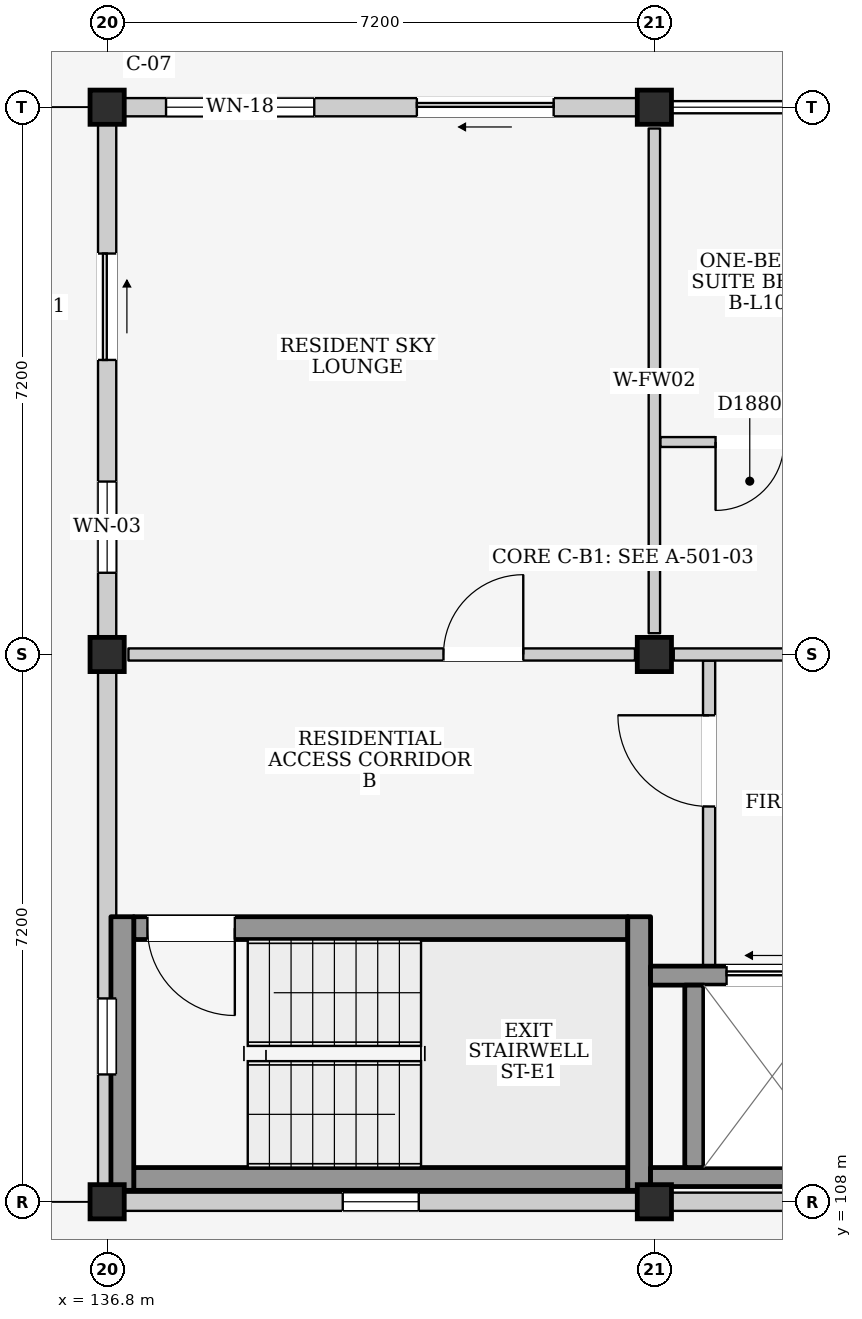
"""IFC4 building model, lengths in metres.
Left out: names, types, materials, properties, quantities, classifications, styles, units other than length and angle.
Written with IfcOpenShell. Run it as: python <this file> out.ifc"""

import sys

from ifc_helpers import new_model, si_unit, direction, frame, frame_2d, origin, origin_2d, place, context, subcontext, project, spatial, rectangle, extrude, element, fill, save


model = new_model("IFC4")
c1 = context("Model", 3, precision=1e-05, world=origin(), true_north=direction((0.0, 1.0)))
c2 = subcontext(c1, "Body", "Model", "MODEL_VIEW")
j1 = project(units=[si_unit("LENGTHUNIT", "METRE"), si_unit("PLANEANGLEUNIT", "RADIAN")], contexts=[c1])
p1 = place(None, origin())
s1 = spatial("IfcSite", under=j1, at=p1, CompositionType="ELEMENT")
p2 = place(p1, origin())
s2 = spatial("IfcBuilding", under=s1, at=p2, CompositionType="ELEMENT")
p3 = place(p2, frame((0.0, 0.0, 34.8)))
s3 = spatial("IfcBuildingStorey", under=s2, at=p3, CompositionType="ELEMENT", Elevation=34.8)
for number, where, z_axis, x_axis in (
    (1, (136.8, 108.0, 0.0), (0.0, 0.0, 1.0), (1.0, 0.0, 0.0)),
    (2, (136.8, 115.2, 0.0), (0.0, 0.0, 1.0), (1.0, 0.0, 0.0)),
    (3, (136.8, 122.4, 0.0), (0.0, 0.0, 1.0), (1.0, 0.0, 0.0)),
    (4, (144.0, 108.0, 0.0), (0.0, 0.0, 1.0), (1.0, 0.0, 0.0)),
    (5, (144.0, 115.2, 0.0), (0.0, 0.0, 1.0), (1.0, 0.0, 0.0)),
    (6, (144.0, 122.4, 0.0), (0.0, 0.0, 1.0), (1.0, 0.0, 0.0)),
):
    element("IfcColumn", number, at=place(p3, frame(where, z_axis=z_axis, x_axis=x_axis)), inside=s3, PredefinedType="COLUMN", context=c2, shape_type="SweptSolid", body=[
        extrude(rectangle(XDim=0.45, YDim=0.45, at=origin_2d()), origin(), (0.0, 0.0, 1.0), 3.2),
    ])
p4 = place(p3, frame((137.025, 108.0, 0.0), z_axis=(0.0, 0.0, 1.0), x_axis=(1.0, 0.0, 0.0)))
e7 = element("IfcWall", 7, at=p4, inside=s3, PredefinedType="ELEMENTEDWALL", context=c2, shape_type="SweptSolid", body=[
    extrude(rectangle(XDim=6.75, YDim=0.24, at=frame_2d((3.375, 0.0))), origin(), (0.0, 0.0, 1.0), 2.345),
])
p5 = place(p4, frame((2.875, 0.0, 1.2)))
e8 = element("IfcOpeningElement", 8, at=p5, cuts=e7, PredefinedType="OPENING", context=c2, shape_type="SweptSolid", body=[
    extrude(rectangle(XDim=1.0, YDim=0.9, at=frame_2d((0.5, 0.45))), frame((0.0, 0.135, 0.0), z_axis=(0.0, -1.0, 0.0), x_axis=(1.0, 0.0, 0.0)), (0.0, 0.0, 1.0), 0.27),
])
p6 = place(p3, frame((136.8, 108.225, 0.0), z_axis=(0.0, 0.0, 1.0), x_axis=(0.0, 1.0, 0.0)))
e9 = element("IfcWall", 9, at=p6, inside=s3, PredefinedType="ELEMENTEDWALL", context=c2, shape_type="SweptSolid", body=[
    extrude(rectangle(XDim=6.75, YDim=0.24, at=frame_2d((3.375, 0.0))), origin(), (0.0, 0.0, 1.0), 2.445),
])
p7 = place(p6, frame((1.45, 0.0, 1.2)))
e10 = element("IfcOpeningElement", 10, at=p7, cuts=e9, PredefinedType="OPENING", context=c2, shape_type="SweptSolid", body=[
    extrude(rectangle(XDim=1.0, YDim=0.9, at=frame_2d((0.5, 0.45))), frame((0.0, 0.135, 0.0), z_axis=(0.0, -1.0, 0.0), x_axis=(1.0, 0.0, 0.0)), (0.0, 0.0, 1.0), 0.27),
])
p8 = place(p3, frame((137.025, 122.4, 0.0), z_axis=(0.0, 0.0, 1.0), x_axis=(1.0, 0.0, 0.0)))
e11 = element("IfcWall", 11, at=p8, inside=s3, PredefinedType="ELEMENTEDWALL", context=c2, shape_type="SweptSolid", body=[
    extrude(rectangle(XDim=6.75, YDim=0.24, at=frame_2d((3.375, 0.0))), origin(), (0.0, 0.0, 1.0), 2.495),
])
p9 = place(p8, frame((3.85, 0.0, 0.0)))
e12 = element("IfcOpeningElement", 12, at=p9, cuts=e11, PredefinedType="OPENING", context=c2, shape_type="SweptSolid", body=[
    extrude(rectangle(XDim=1.8, YDim=2.12, at=frame_2d((0.9, 1.06))), frame((0.0, 0.135, 0.0), z_axis=(0.0, -1.0, 0.0), x_axis=(1.0, 0.0, 0.0)), (0.0, 0.0, 1.0), 0.27),
])
p10 = place(p8, frame((0.55, 0.0, 0.835)))
e13 = element("IfcOpeningElement", 13, at=p10, cuts=e11, PredefinedType="OPENING", context=c2, shape_type="SweptSolid", body=[
    extrude(rectangle(XDim=1.95, YDim=1.55, at=frame_2d((0.975, 0.775))), frame((0.0, 0.135, 0.0), z_axis=(0.0, -1.0, 0.0), x_axis=(1.0, 0.0, 0.0)), (0.0, 0.0, 1.0), 0.27),
])
p11 = place(p3, frame((136.8, 115.425, 0.0), z_axis=(0.0, 0.0, 1.0), x_axis=(0.0, 1.0, 0.0)))
e14 = element("IfcWall", 14, at=p11, inside=s3, PredefinedType="ELEMENTEDWALL", context=c2, shape_type="SweptSolid", body=[
    extrude(rectangle(XDim=6.75, YDim=0.24, at=frame_2d((3.375, 0.0))), origin(), (0.0, 0.0, 1.0), 2.445),
])
p12 = place(p11, frame((3.65, 0.0, 0.0)))
e15 = element("IfcOpeningElement", 15, at=p12, cuts=e14, PredefinedType="OPENING", context=c2, shape_type="SweptSolid", body=[
    extrude(rectangle(XDim=1.4, YDim=2.1, at=frame_2d((0.7, 1.05))), frame((0.0, 0.135, 0.0), z_axis=(0.0, -1.0, 0.0), x_axis=(1.0, 0.0, 0.0)), (0.0, 0.0, 1.0), 0.27),
])
p13 = place(p11, frame((0.85, 0.0, 0.95)))
e16 = element("IfcOpeningElement", 16, at=p13, cuts=e14, PredefinedType="OPENING", context=c2, shape_type="SweptSolid", body=[
    extrude(rectangle(XDim=1.2, YDim=1.35, at=frame_2d((0.6, 0.675))), frame((0.0, 0.135, 0.0), z_axis=(0.0, -1.0, 0.0), x_axis=(1.0, 0.0, 0.0)), (0.0, 0.0, 1.0), 0.27),
])
p14 = place(p3, frame((144.225, 108.0, 0.0), z_axis=(0.0, 0.0, 1.0), x_axis=(1.0, 0.0, 0.0)))
e17 = element("IfcWall", 17, at=p14, inside=s3, PredefinedType="ELEMENTEDWALL", context=c2, shape_type="SweptSolid", body=[
    extrude(rectangle(XDim=6.75, YDim=0.24, at=frame_2d((3.375, 0.0))), origin(), (0.0, 0.0, 1.0), 2.345),
])
p15 = place(p14, frame((2.875, 0.0, 1.2)))
e18 = element("IfcOpeningElement", 18, at=p15, cuts=e17, PredefinedType="OPENING", context=c2, shape_type="SweptSolid", body=[
    extrude(rectangle(XDim=1.0, YDim=0.9, at=frame_2d((0.5, 0.45))), frame((0.0, 0.135, 0.0), z_axis=(0.0, -1.0, 0.0), x_axis=(1.0, 0.0, 0.0)), (0.0, 0.0, 1.0), 0.27),
])
p16 = place(p3, frame((137.15, 108.3, 0.0), z_axis=(0.0, 0.0, 1.0), x_axis=(1.0, 0.0, 0.0)))
e19 = element("IfcWall", 19, at=p16, inside=s3, PredefinedType="SHEAR", context=c2, shape_type="SweptSolid", body=[
    extrude(rectangle(XDim=6.5, YDim=0.3, at=frame_2d((3.25, 0.0))), origin(), (0.0, 0.0, 1.0), 2.96),
])
p17 = place(p3, frame((137.15, 111.6, 0.0), z_axis=(0.0, 0.0, 1.0), x_axis=(1.0, 0.0, 0.0)))
e20 = element("IfcWall", 20, at=p17, inside=s3, PredefinedType="SHEAR", context=c2, shape_type="SweptSolid", body=[
    extrude(rectangle(XDim=6.5, YDim=0.3, at=frame_2d((3.25, 0.0))), origin(), (0.0, 0.0, 1.0), 2.96),
])
p18 = place(p17, frame((0.18, 0.0, 0.0)))
e21 = element("IfcOpeningElement", 21, at=p18, cuts=e20, PredefinedType="OPENING", context=c2, shape_type="SweptSolid", body=[
    extrude(rectangle(XDim=1.15, YDim=2.2, at=frame_2d((0.575, 1.1))), frame((0.0, 0.165, 0.0), z_axis=(0.0, -1.0, 0.0), x_axis=(1.0, 0.0, 0.0)), (0.0, 0.0, 1.0), 0.33),
])
for number, where, z_axis, x_axis in (
    (22, (137.0, 108.15, 0.0), (0.0, 0.0, 1.0), (0.0, 1.0, 0.0)),
    (23, (143.8, 108.15, 0.0), (0.0, 0.0, 1.0), (0.0, 1.0, 0.0)),
):
    element("IfcWall", number, at=place(p3, frame(where, z_axis=z_axis, x_axis=x_axis)), inside=s3, PredefinedType="SHEAR", context=c2, shape_type="SweptSolid", body=[
        extrude(rectangle(XDim=3.6, YDim=0.3, at=frame_2d((1.8, 0.0))), origin(), (0.0, 0.0, 1.0), 2.96),
    ])
p19 = place(p3, frame((144.72, 111.1, 0.0), z_axis=(0.0, 0.0, 1.0), x_axis=(0.0, 1.0, 0.0)))
e24 = element("IfcWall", 24, at=p19, inside=s3, PredefinedType="PARTITIONING", context=c2, shape_type="SweptSolid", body=[
    extrude(rectangle(XDim=4.02, YDim=0.16, at=frame_2d((2.01, 0.0))), origin(), (0.0, 0.0, 1.0), 2.96),
])
p20 = place(p19, frame((2.1, 0.0, 0.0)))
e25 = element("IfcOpeningElement", 25, at=p20, cuts=e24, PredefinedType="OPENING", context=c2, shape_type="SweptSolid", body=[
    extrude(rectangle(XDim=1.2, YDim=2.2, at=frame_2d((0.6, 1.1))), frame((0.0, 0.095, 0.0), z_axis=(0.0, -1.0, 0.0), x_axis=(1.0, 0.0, 0.0)), (0.0, 0.0, 1.0), 0.19),
])
p21 = place(p3, frame((143.95, 108.325, 0.0), z_axis=(0.0, 0.0, 1.0), x_axis=(1.0, 0.0, 0.0)))
e26 = element("IfcWall", 26, at=p21, inside=s3, PredefinedType="SHEAR", context=c2, shape_type="SweptSolid", body=[
    extrude(rectangle(XDim=2.675, YDim=0.25, at=frame_2d((1.337, 0.0))), origin(), (0.0, 0.0, 1.0), 2.96),
])
p22 = place(p3, frame((143.95, 110.975, 0.0), z_axis=(0.0, 0.0, 1.0), x_axis=(1.0, 0.0, 0.0)))
e27 = element("IfcWall", 27, at=p22, inside=s3, PredefinedType="SHEAR", context=c2, shape_type="SweptSolid", body=[
    extrude(rectangle(XDim=2.675, YDim=0.25, at=frame_2d((1.337, 0.0))), origin(), (0.0, 0.0, 1.0), 2.96),
])
p23 = place(p22, frame((1.0, 0.0, 0.0)))
e28 = element("IfcOpeningElement", 28, at=p23, cuts=e27, PredefinedType="OPENING", context=c2, shape_type="SweptSolid", body=[
    extrude(rectangle(XDim=1.2, YDim=2.25, at=frame_2d((0.6, 1.125))), frame((0.0, 0.14, 0.0), z_axis=(0.0, -1.0, 0.0), x_axis=(1.0, 0.0, 0.0)), (0.0, 0.0, 1.0), 0.28),
])
p24 = place(p3, frame((144.525, 108.45, 0.0), z_axis=(0.0, 0.0, 1.0), x_axis=(0.0, 1.0, 0.0)))
e29 = element("IfcWall", 29, at=p24, inside=s3, PredefinedType="SHEAR", context=c2, shape_type="SweptSolid", body=[
    extrude(rectangle(XDim=2.4, YDim=0.25, at=frame_2d((1.2, 0.0))), origin(), (0.0, 0.0, 1.0), 2.96),
])
p25 = place(p3, frame((137.08, 115.2, 0.0), z_axis=(0.0, 0.0, 1.0), x_axis=(1.0, 0.0, 0.0)))
e30 = element("IfcWall", 30, at=p25, inside=s3, PredefinedType="PARTITIONING", context=c2, shape_type="SweptSolid", body=[
    extrude(rectangle(XDim=6.665, YDim=0.16, at=frame_2d((3.333, 0.0))), origin(), (0.0, 0.0, 1.0), 2.345),
])
p26 = place(p25, frame((4.145, 0.0, 0.0)))
e31 = element("IfcOpeningElement", 31, at=p26, cuts=e30, PredefinedType="OPENING", context=c2, shape_type="SweptSolid", body=[
    extrude(rectangle(XDim=1.05, YDim=2.2, at=frame_2d((0.525, 1.1))), frame((0.0, 0.095, 0.0), z_axis=(0.0, -1.0, 0.0), x_axis=(1.0, 0.0, 0.0)), (0.0, 0.0, 1.0), 0.19),
])
p27 = place(p3, frame((144.0, 115.48, 0.0), z_axis=(0.0, 0.0, 1.0), x_axis=(0.0, 1.0, 0.0)))
e32 = element("IfcWall", 32, at=p27, inside=s3, PredefinedType="PARTITIONING", context=c2, shape_type="SweptSolid", body=[
    extrude(rectangle(XDim=6.64, YDim=0.15, at=frame_2d((3.32, 0.0))), origin(), (0.0, 0.0, 1.0), 2.445),
])
p28 = place(p3, frame((144.255, 115.2, 0.0), z_axis=(0.0, 0.0, 1.0), x_axis=(1.0, 0.0, 0.0)))
e33 = element("IfcWall", 33, at=p28, inside=s3, PredefinedType="PARTITIONING", context=c2, shape_type="SweptSolid", body=[
    extrude(rectangle(XDim=6.69, YDim=0.16, at=frame_2d((3.345, 0.0))), origin(), (0.0, 0.0, 1.0), 2.345),
])
p29 = place(p28, frame((4.395, 0.0, 0.0)))
e34 = element("IfcOpeningElement", 34, at=p29, cuts=e33, PredefinedType="OPENING", context=c2, shape_type="SweptSolid", body=[
    extrude(rectangle(XDim=1.0, YDim=2.15, at=frame_2d((0.5, 1.075))), frame((0.0, 0.095, 0.0), z_axis=(0.0, -1.0, 0.0), x_axis=(1.0, 0.0, 0.0)), (0.0, 0.0, 1.0), 0.19),
])
p30 = place(p3, frame((144.08, 117.995, 0.0), z_axis=(0.0, 0.0, 1.0), x_axis=(1.0, 0.0, 0.0)))
e35 = element("IfcWall", 35, at=p30, inside=s3, PredefinedType="PARTITIONING", context=c2, shape_type="SweptSolid", body=[
    extrude(rectangle(XDim=2.35, YDim=0.13, at=frame_2d((1.175, 0.0))), origin(), (0.0, 0.0, 1.0), 2.96),
])
p31 = place(p30, frame((0.725, 0.0, 0.0)))
e36 = element("IfcOpeningElement", 36, at=p31, cuts=e35, PredefinedType="OPENING", context=c2, shape_type="SweptSolid", body=[
    extrude(rectangle(XDim=0.9, YDim=2.1, at=frame_2d((0.45, 1.05))), frame((0.0, 0.08, 0.0), z_axis=(0.0, -1.0, 0.0), x_axis=(1.0, 0.0, 0.0)), (0.0, 0.0, 1.0), 0.16),
])
p32 = place(p5, origin())
e37 = element("IfcWindow", 37, at=p32, inside=s3, PartitioningType="SINGLE_PANEL", PredefinedType="WINDOW", context=c2, shape_type="SweptSolid", body=[
    extrude(rectangle(XDim=1.0, YDim=0.9, at=frame_2d((0.5, 0.45))), frame((0.0, 0.03, 0.0), z_axis=(0.0, -1.0, 0.0), x_axis=(1.0, 0.0, 0.0)), (0.0, 0.0, 1.0), 0.06),
])
fill(e8, e37)
p33 = place(p7, origin())
e38 = element("IfcWindow", 38, at=p33, inside=s3, PartitioningType="SINGLE_PANEL", PredefinedType="WINDOW", context=c2, shape_type="SweptSolid", body=[
    extrude(rectangle(XDim=1.0, YDim=0.9, at=frame_2d((0.5, 0.45))), frame((0.0, 0.03, 0.0), z_axis=(0.0, -1.0, 0.0), x_axis=(1.0, 0.0, 0.0)), (0.0, 0.0, 1.0), 0.06),
])
fill(e10, e38)
p34 = place(p9, frame((1.8, 0.0, 0.0), z_axis=(0.0, 0.0, 1.0), x_axis=(-1.0, 0.0, 0.0)))
e39 = element("IfcDoor", 39, at=p34, inside=s3, OperationType="SLIDING_TO_LEFT", PredefinedType="DOOR", context=c2, shape_type="SweptSolid", body=[
    extrude(rectangle(XDim=1.8, YDim=2.12, at=frame_2d((0.9, 1.06))), frame((0.0, 0.025, 0.0), z_axis=(0.0, -1.0, 0.0), x_axis=(1.0, 0.0, 0.0)), (0.0, 0.0, 1.0), 0.05),
])
fill(e12, e39)
p35 = place(p10, origin())
e40 = element("IfcWindow", 40, at=p35, inside=s3, PartitioningType="DOUBLE_PANEL_VERTICAL", PredefinedType="WINDOW", context=c2, shape_type="SweptSolid", body=[
    extrude(rectangle(XDim=1.95, YDim=1.55, at=frame_2d((0.975, 0.775))), frame((0.0, 0.03, 0.0), z_axis=(0.0, -1.0, 0.0), x_axis=(1.0, 0.0, 0.0)), (0.0, 0.0, 1.0), 0.06),
])
fill(e13, e40)
p36 = place(p12, frame((1.4, 0.0, 0.0), z_axis=(0.0, 0.0, 1.0), x_axis=(-1.0, 0.0, 0.0)))
e41 = element("IfcDoor", 41, at=p36, inside=s3, OperationType="SLIDING_TO_RIGHT", PredefinedType="DOOR", context=c2, shape_type="SweptSolid", body=[
    extrude(rectangle(XDim=1.4, YDim=2.1, at=frame_2d((0.7, 1.05))), frame((0.0, 0.025, 0.0), z_axis=(0.0, -1.0, 0.0), x_axis=(1.0, 0.0, 0.0)), (0.0, 0.0, 1.0), 0.05),
])
fill(e15, e41)
p37 = place(p13, origin())
e42 = element("IfcWindow", 42, at=p37, inside=s3, PartitioningType="SINGLE_PANEL", PredefinedType="WINDOW", context=c2, shape_type="SweptSolid", body=[
    extrude(rectangle(XDim=1.2, YDim=1.35, at=frame_2d((0.6, 0.675))), frame((0.0, 0.03, 0.0), z_axis=(0.0, -1.0, 0.0), x_axis=(1.0, 0.0, 0.0)), (0.0, 0.0, 1.0), 0.06),
])
fill(e16, e42)
p38 = place(p18, frame((1.15, 0.0, 0.0), z_axis=(0.0, 0.0, 1.0), x_axis=(-1.0, 0.0, 0.0)))
e43 = element("IfcDoor", 43, at=p38, inside=s3, OperationType="SINGLE_SWING_LEFT", PredefinedType="DOOR", context=c2, shape_type="SweptSolid", body=[
    extrude(rectangle(XDim=1.15, YDim=2.2, at=frame_2d((0.575, 1.1))), frame((0.0, 0.025, 0.0), z_axis=(0.0, -1.0, 0.0), x_axis=(1.0, 0.0, 0.0)), (0.0, 0.0, 1.0), 0.05),
])
fill(e21, e43)
p39 = place(p20, origin())
e44 = element("IfcDoor", 44, at=p39, inside=s3, OperationType="SINGLE_SWING_RIGHT", PredefinedType="DOOR", context=c2, shape_type="SweptSolid", body=[
    extrude(rectangle(XDim=1.2, YDim=2.2, at=frame_2d((0.6, 1.1))), frame((0.0, 0.025, 0.0), z_axis=(0.0, -1.0, 0.0), x_axis=(1.0, 0.0, 0.0)), (0.0, 0.0, 1.0), 0.05),
])
fill(e25, e44)
p40 = place(p23, origin())
e45 = element("IfcDoor", 45, at=p40, inside=s3, OperationType="SLIDING_TO_LEFT", PredefinedType="DOOR", context=c2, shape_type="SweptSolid", body=[
    extrude(rectangle(XDim=1.2, YDim=2.25, at=frame_2d((0.6, 1.125))), frame((0.0, 0.025, 0.0), z_axis=(0.0, -1.0, 0.0), x_axis=(1.0, 0.0, 0.0)), (0.0, 0.0, 1.0), 0.05),
])
fill(e28, e45)
p41 = place(p26, origin())
e46 = element("IfcDoor", 46, at=p41, inside=s3, OperationType="SINGLE_SWING_RIGHT", PredefinedType="DOOR", context=c2, shape_type="SweptSolid", body=[
    extrude(rectangle(XDim=1.05, YDim=2.2, at=frame_2d((0.525, 1.1))), frame((0.0, 0.025, 0.0), z_axis=(0.0, -1.0, 0.0), x_axis=(1.0, 0.0, 0.0)), (0.0, 0.0, 1.0), 0.05),
])
fill(e31, e46)
p42 = place(p31, frame((0.9, 0.0, 0.0), z_axis=(0.0, 0.0, 1.0), x_axis=(-1.0, 0.0, 0.0)))
e47 = element("IfcDoor", 47, at=p42, inside=s3, OperationType="SINGLE_SWING_RIGHT", PredefinedType="DOOR", context=c2, shape_type="SweptSolid", body=[
    extrude(rectangle(XDim=0.9, YDim=2.1, at=frame_2d((0.45, 1.05))), frame((0.0, 0.025, 0.0), z_axis=(0.0, -1.0, 0.0), x_axis=(1.0, 0.0, 0.0)), (0.0, 0.0, 1.0), 0.05),
])
fill(e36, e47)
save(model, sys.argv[1])
